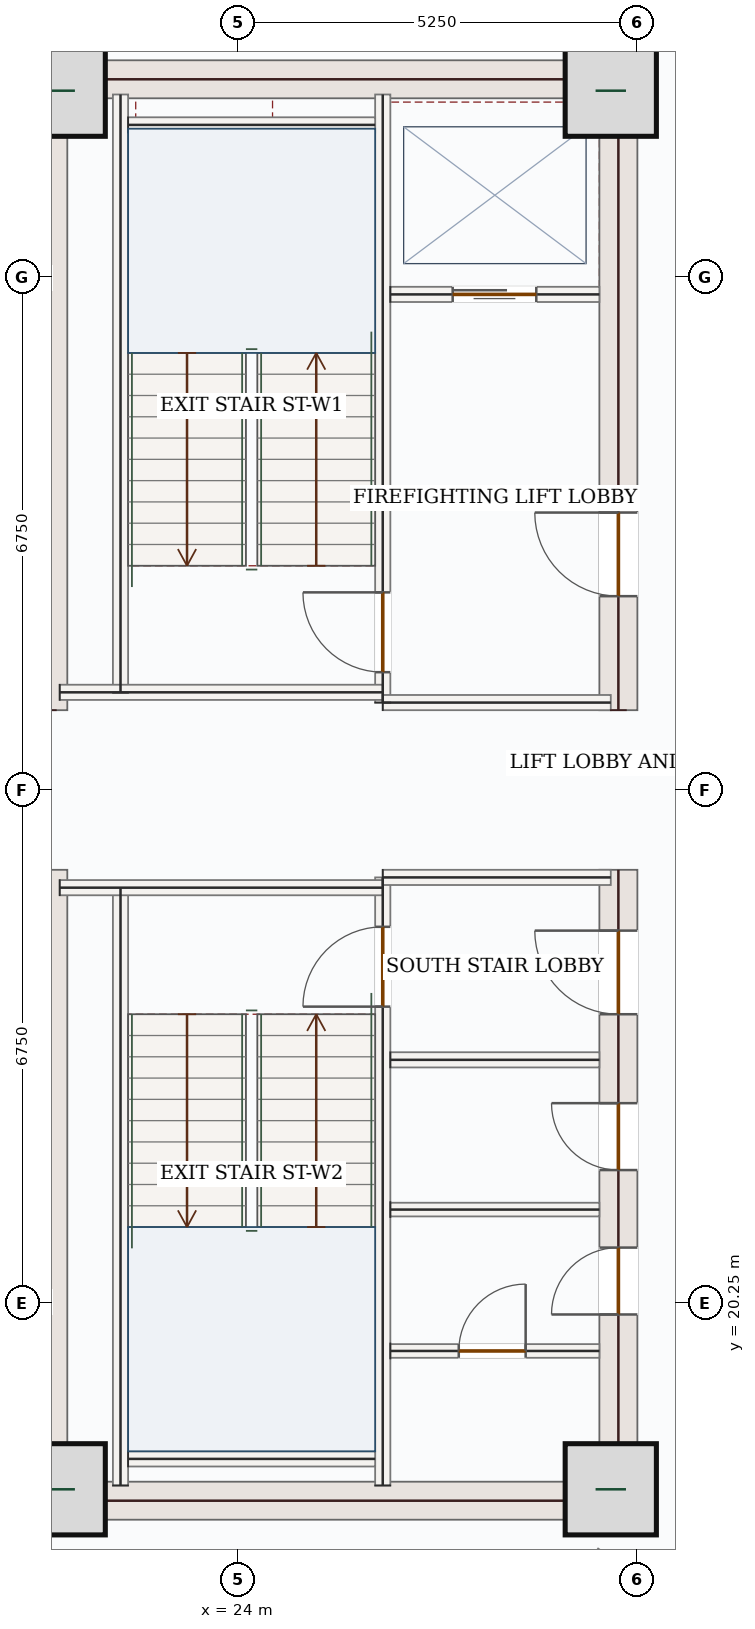
"""IFC4 building model, lengths in metres.
Left out: names, types, materials, properties, quantities, classifications, styles, units other than length and angle.
Written with IfcOpenShell. Run it as: python <this file> out.ifc"""

import sys

from ifc_helpers import new_model, si_unit, direction, frame, frame_2d, origin, origin_2d, place, context, subcontext, project, spatial, rectangle, extrude, source, transform, mapped, element, fill, save


model = new_model("IFC4")
c1 = context("Model", 3, precision=1e-05, world=origin(), true_north=direction((0.0, 1.0)))
c2 = subcontext(c1, "Body", "Model", "MODEL_VIEW")
j1 = project(units=[si_unit("LENGTHUNIT", "METRE"), si_unit("PLANEANGLEUNIT", "RADIAN")], contexts=[c1])
p1 = place(None, origin())
s1 = spatial("IfcSite", under=j1, at=p1, CompositionType="ELEMENT")
p2 = place(p1, origin())
s2 = spatial("IfcBuilding", under=s1, at=p2, CompositionType="ELEMENT")
p3 = place(p2, frame((0.0, 0.0, 135.6)))
s3 = spatial("IfcBuildingStorey", under=s2, at=p3, CompositionType="ELEMENT", Elevation=135.6)
m1 = source(origin(), c2, "Body", "SweptSolid", [
    extrude(rectangle(XDim=8.55, YDim=0.5, at=frame_2d((4.275, 0.0))), origin(), (0.0, 0.0, 1.0), 3.62),
])
for number, where, z_axis, x_axis in (
    (1, (21.5, 17.4, 0.0), (0.0, 0.0, 1.0), (0.0, 1.0, 0.0)),
    (2, (21.5, 28.05, 0.0), (0.0, 0.0, 1.0), (0.0, 1.0, 0.0)),
):
    element("IfcWall", number, at=place(p3, frame(where, z_axis=z_axis, x_axis=x_axis)), inside=s3, PredefinedType="SHEAR", context=c2, shape_type="MappedRepresentation", body=[
        mapped(m1, transform((0.0, 0.0, 0.0), x_axis=(1.0, 0.0, 0.0), y_axis=(0.0, 1.0, 0.0), z_axis=(0.0, 0.0, 1.0), scale=1.0)),
    ])
p4 = place(p3, frame((29.0, 17.4, 0.0), z_axis=(0.0, 0.0, 1.0), x_axis=(0.0, 1.0, 0.0)))
e3 = element("IfcWall", 3, at=p4, inside=s3, PredefinedType="SHEAR", context=c2, shape_type="SweptSolid", body=[
    extrude(rectangle(XDim=8.55, YDim=0.5, at=frame_2d((4.275, 0.0))), origin(), (0.0, 0.0, 1.0), 3.62),
])
p5 = place(p4, frame((6.65, 0.0, 0.0)))
e4 = element("IfcOpeningElement", 4, at=p5, cuts=e3, PredefinedType="OPENING", context=c2, shape_type="SweptSolid", body=[
    extrude(rectangle(XDim=1.1, YDim=2.2, at=frame_2d((0.55, 1.1))), frame((0.0, 0.26, 0.0), z_axis=(0.0, -1.0, 0.0), x_axis=(1.0, 0.0, 0.0)), (0.0, 0.0, 1.0), 0.52),
])
p6 = place(p4, frame((2.7, 0.0, 0.0)))
e5 = element("IfcOpeningElement", 5, at=p6, cuts=e3, PredefinedType="OPENING", context=c2, shape_type="SweptSolid", body=[
    extrude(rectangle(XDim=0.88, YDim=2.1, at=frame_2d((0.44, 1.05))), frame((0.0, 0.26, 0.0), z_axis=(0.0, -1.0, 0.0), x_axis=(1.0, 0.0, 0.0)), (0.0, 0.0, 1.0), 0.52),
])
p7 = place(p4, frame((4.6, 0.0, 0.0)))
e6 = element("IfcOpeningElement", 6, at=p7, cuts=e3, PredefinedType="OPENING", context=c2, shape_type="SweptSolid", body=[
    extrude(rectangle(XDim=0.88, YDim=2.1, at=frame_2d((0.44, 1.05))), frame((0.0, 0.26, 0.0), z_axis=(0.0, -1.0, 0.0), x_axis=(1.0, 0.0, 0.0)), (0.0, 0.0, 1.0), 0.52),
])
p8 = place(p3, frame((29.0, 28.05, 0.0), z_axis=(0.0, 0.0, 1.0), x_axis=(0.0, 1.0, 0.0)))
e7 = element("IfcWall", 7, at=p8, inside=s3, PredefinedType="SHEAR", context=c2, shape_type="SweptSolid", body=[
    extrude(rectangle(XDim=8.55, YDim=0.5, at=frame_2d((4.275, 0.0))), origin(), (0.0, 0.0, 1.0), 3.62),
])
p9 = place(p8, frame((1.5, 0.0, 0.0)))
e8 = element("IfcOpeningElement", 8, at=p9, cuts=e7, PredefinedType="OPENING", context=c2, shape_type="SweptSolid", body=[
    extrude(rectangle(XDim=1.1, YDim=2.2, at=frame_2d((0.55, 1.1))), frame((0.0, 0.26, 0.0), z_axis=(0.0, -1.0, 0.0), x_axis=(1.0, 0.0, 0.0)), (0.0, 0.0, 1.0), 0.52),
])
m2 = source(origin(), c2, "Body", "SweptSolid", [
    extrude(rectangle(XDim=7.0, YDim=0.5, at=frame_2d((3.5, 0.0))), origin(), (0.0, 0.0, 1.0), 3.62),
])
for number, where, z_axis, x_axis in (
    (9, (21.75, 17.65, 0.0), (0.0, 0.0, 1.0), (1.0, 0.0, 0.0)),
    (10, (21.75, 36.35, 0.0), (0.0, 0.0, 1.0), (1.0, 0.0, 0.0)),
):
    element("IfcWall", number, at=place(p3, frame(where, z_axis=z_axis, x_axis=x_axis)), inside=s3, PredefinedType="SHEAR", context=c2, shape_type="MappedRepresentation", body=[
        mapped(m2, transform((0.0, 0.0, 0.0), x_axis=(1.0, 0.0, 0.0), y_axis=(0.0, 1.0, 0.0), z_axis=(0.0, 0.0, 1.0), scale=1.0)),
    ])
m3 = source(origin(), c2, "Body", "SweptSolid", [
    extrude(rectangle(XDim=1.2, YDim=1.2, at=origin_2d()), origin(), (0.0, 0.0, 1.0), 3.9),
])
for number, where, z_axis, x_axis in (
    (11, (21.65, 17.8, 0.0), (0.0, 0.0, 1.0), (1.0, 0.0, 0.0)),
    (12, (28.9, 17.8, 0.0), (0.0, 0.0, 1.0), (1.0, 0.0, 0.0)),
    (13, (21.65, 36.2, 0.0), (0.0, 0.0, 1.0), (1.0, 0.0, 0.0)),
    (14, (28.9, 36.2, 0.0), (0.0, 0.0, 1.0), (1.0, 0.0, 0.0)),
):
    element("IfcColumn", number, at=place(p3, frame(where, z_axis=z_axis, x_axis=x_axis)), inside=s3, PredefinedType="COLUMN", context=c2, shape_type="MappedRepresentation", body=[
        mapped(m3, transform((0.0, 0.0, 0.0), x_axis=(1.0, 0.0, 0.0), y_axis=(0.0, 1.0, 0.0), z_axis=(0.0, 0.0, 1.0), scale=1.0)),
    ])
p10 = place(p3, frame((22.658, 14.74, 0.0), z_axis=(0.0, 0.0, 1.0), x_axis=(-0.707076011326, 0.707137549708, 0.0)))
e15 = element("IfcWall", 15, at=p10, inside=s3, PredefinedType="SOLIDWALL", context=c2, shape_type="SweptSolid", body=[
    extrude(rectangle(XDim=3.967, YDim=0.28, at=frame_2d((1.984, 0.0))), origin(), (0.0, 0.0, 1.0), 3.62),
])
p11 = place(p10, frame((1.084, 0.0, 0.85)))
e16 = element("IfcOpeningElement", 16, at=p11, cuts=e15, PredefinedType="OPENING", context=c2, shape_type="SweptSolid", body=[
    extrude(rectangle(XDim=1.8, YDim=1.75, at=frame_2d((0.9, 0.875))), frame((0.0, 0.15, 0.0), z_axis=(0.0, -1.0, 0.0), x_axis=(1.0, 0.0, 0.0)), (0.0, 0.0, 1.0), 0.3),
])
m4 = source(origin(), c2, "Body", "SweptSolid", [
    extrude(rectangle(XDim=5.258, YDim=0.28, at=frame_2d((2.629, 0.0))), origin(), (0.0, 0.0, 1.0), 3.62),
])
p12 = place(p3, frame((18.94, 35.542, 0.0), z_axis=(0.0, 0.0, 1.0), x_axis=(0.707106781187, 0.707106781187, 0.0)))
e17 = element("IfcWall", 17, at=p12, inside=s3, PredefinedType="SOLIDWALL", context=c2, shape_type="MappedRepresentation", body=[
    mapped(m4, transform((0.0, 0.0, 0.0), x_axis=(1.0, 0.0, 0.0), y_axis=(0.0, 1.0, 0.0), z_axis=(0.0, 0.0, 1.0), scale=1.0)),
])
m5 = source(origin(), c2, "Body", "SweptSolid", [
    extrude(rectangle(XDim=7.87, YDim=0.2, at=frame_2d((3.935, 0.0))), origin(), (0.0, 0.0, 1.0), 3.62),
])
for number, where, z_axis, x_axis in (
    (18, (22.45, 17.85, 0.0), (0.0, 0.0, 1.0), (0.0, 1.0, 0.0)),
    (19, (22.45, 28.28, 0.0), (0.0, 0.0, 1.0), (0.0, 1.0, 0.0)),
):
    element("IfcWall", number, at=place(p3, frame(where, z_axis=z_axis, x_axis=x_axis)), inside=s3, PredefinedType="SOLIDWALL", context=c2, shape_type="MappedRepresentation", body=[
        mapped(m5, transform((0.0, 0.0, 0.0), x_axis=(1.0, 0.0, 0.0), y_axis=(0.0, 1.0, 0.0), z_axis=(0.0, 0.0, 1.0), scale=1.0)),
    ])
p13 = place(p3, frame((25.9, 17.85, 0.0), z_axis=(0.0, 0.0, 1.0), x_axis=(0.0, 1.0, 0.0)))
e20 = element("IfcWall", 20, at=p13, inside=s3, PredefinedType="SOLIDWALL", context=c2, shape_type="SweptSolid", body=[
    extrude(rectangle(XDim=8.0, YDim=0.2, at=frame_2d((4.0, 0.0))), origin(), (0.0, 0.0, 1.0), 3.62),
])
p14 = place(p13, frame((6.3, 0.0, 0.0)))
e21 = element("IfcOpeningElement", 21, at=p14, cuts=e20, PredefinedType="OPENING", context=c2, shape_type="SweptSolid", body=[
    extrude(rectangle(XDim=1.05, YDim=2.15, at=frame_2d((0.525, 1.075))), frame((0.0, 0.11, 0.0), z_axis=(0.0, -1.0, 0.0), x_axis=(1.0, 0.0, 0.0)), (0.0, 0.0, 1.0), 0.22),
])
p15 = place(p3, frame((25.9, 28.15, 0.0), z_axis=(0.0, 0.0, 1.0), x_axis=(0.0, 1.0, 0.0)))
e22 = element("IfcWall", 22, at=p15, inside=s3, PredefinedType="SOLIDWALL", context=c2, shape_type="SweptSolid", body=[
    extrude(rectangle(XDim=8.0, YDim=0.2, at=frame_2d((4.0, 0.0))), origin(), (0.0, 0.0, 1.0), 3.62),
])
p16 = place(p15, frame((0.4, 0.0, 0.0)))
e23 = element("IfcOpeningElement", 23, at=p16, cuts=e22, PredefinedType="OPENING", context=c2, shape_type="SweptSolid", body=[
    extrude(rectangle(XDim=1.05, YDim=2.15, at=frame_2d((0.525, 1.075))), frame((0.0, 0.11, 0.0), z_axis=(0.0, -1.0, 0.0), x_axis=(1.0, 0.0, 0.0)), (0.0, 0.0, 1.0), 0.22),
])
m6 = source(origin(), c2, "Body", "SweptSolid", [
    extrude(rectangle(XDim=4.25, YDim=0.2, at=frame_2d((2.125, 0.0))), origin(), (0.0, 0.0, 1.0), 3.62),
])
p17 = place(p3, frame((21.65, 25.715, 0.0), z_axis=(0.0, 0.0, 1.0), x_axis=(1.0, 0.0, 0.0)))
e24 = element("IfcWall", 24, at=p17, inside=s3, PredefinedType="SOLIDWALL", context=c2, shape_type="MappedRepresentation", body=[
    mapped(m6, transform((0.0, 0.0, 0.0), x_axis=(1.0, 0.0, 0.0), y_axis=(0.0, 1.0, 0.0), z_axis=(0.0, 0.0, 1.0), scale=1.0)),
])
m7 = source(origin(), c2, "Body", "SweptSolid", [
    extrude(rectangle(XDim=3.0, YDim=0.2, at=frame_2d((1.5, 0.0))), origin(), (0.0, 0.0, 1.0), 3.62),
])
p18 = place(p3, frame((25.9, 25.85, 0.0), z_axis=(0.0, 0.0, 1.0), x_axis=(1.0, 0.0, 0.0)))
e25 = element("IfcWall", 25, at=p18, inside=s3, PredefinedType="SOLIDWALL", context=c2, shape_type="MappedRepresentation", body=[
    mapped(m7, transform((0.0, 0.0, 0.0), x_axis=(1.0, 0.0, 0.0), y_axis=(0.0, 1.0, 0.0), z_axis=(0.0, 0.0, 1.0), scale=1.0)),
])
p19 = place(p3, frame((21.65, 28.285, 0.0), z_axis=(0.0, 0.0, 1.0), x_axis=(1.0, 0.0, 0.0)))
e26 = element("IfcWall", 26, at=p19, inside=s3, PredefinedType="SOLIDWALL", context=c2, shape_type="MappedRepresentation", body=[
    mapped(m6, transform((0.0, 0.0, 0.0), x_axis=(1.0, 0.0, 0.0), y_axis=(0.0, 1.0, 0.0), z_axis=(0.0, 0.0, 1.0), scale=1.0)),
])
p20 = place(p3, frame((25.9, 28.15, 0.0), z_axis=(0.0, 0.0, 1.0), x_axis=(1.0, 0.0, 0.0)))
e27 = element("IfcWall", 27, at=p20, inside=s3, PredefinedType="SOLIDWALL", context=c2, shape_type="MappedRepresentation", body=[
    mapped(m7, transform((0.0, 0.0, 0.0), x_axis=(1.0, 0.0, 0.0), y_axis=(0.0, 1.0, 0.0), z_axis=(0.0, 0.0, 1.0), scale=1.0)),
])
m8 = source(origin(), c2, "Body", "SweptSolid", [
    extrude(rectangle(XDim=3.25, YDim=0.2, at=frame_2d((1.625, 0.0))), origin(), (0.0, 0.0, 1.0), 3.62),
])
for number, where, z_axis, x_axis in (
    (28, (22.55, 35.75, 0.0), (0.0, 0.0, 1.0), (1.0, 0.0, 0.0)),
    (29, (22.55, 18.2, 0.0), (0.0, 0.0, 1.0), (1.0, 0.0, 0.0)),
):
    element("IfcWall", number, at=place(p3, frame(where, z_axis=z_axis, x_axis=x_axis)), inside=s3, PredefinedType="SOLIDWALL", context=c2, shape_type="MappedRepresentation", body=[
        mapped(m8, transform((0.0, 0.0, 0.0), x_axis=(1.0, 0.0, 0.0), y_axis=(0.0, 1.0, 0.0), z_axis=(0.0, 0.0, 1.0), scale=1.0)),
    ])
p21 = place(p3, frame((26.0, 33.52, 0.0), z_axis=(0.0, 0.0, 1.0), x_axis=(1.0, 0.0, 0.0)))
e30 = element("IfcWall", 30, at=p21, inside=s3, PredefinedType="SOLIDWALL", context=c2, shape_type="SweptSolid", body=[
    extrude(rectangle(XDim=2.75, YDim=0.2, at=frame_2d((1.375, 0.0))), origin(), (0.0, 0.0, 1.0), 3.62),
])
p22 = place(p21, frame((0.82, 0.0, 0.0)))
e31 = element("IfcOpeningElement", 31, at=p22, cuts=e30, PredefinedType="OPENING", context=c2, shape_type="SweptSolid", body=[
    extrude(rectangle(XDim=1.1, YDim=2.15, at=frame_2d((0.55, 1.075))), frame((0.0, 0.11, 0.0), z_axis=(0.0, -1.0, 0.0), x_axis=(1.0, 0.0, 0.0)), (0.0, 0.0, 1.0), 0.22),
])
m9 = source(origin(), c2, "Body", "SweptSolid", [
    extrude(rectangle(XDim=2.75, YDim=0.2, at=frame_2d((1.375, 0.0))), origin(), (0.0, 0.0, 1.0), 3.62),
])
p23 = place(p3, frame((26.0, 23.45, 0.0), z_axis=(0.0, 0.0, 1.0), x_axis=(1.0, 0.0, 0.0)))
e32 = element("IfcWall", 32, at=p23, inside=s3, PredefinedType="SOLIDWALL", context=c2, shape_type="MappedRepresentation", body=[
    mapped(m9, transform((0.0, 0.0, 0.0), x_axis=(1.0, 0.0, 0.0), y_axis=(0.0, 1.0, 0.0), z_axis=(0.0, 0.0, 1.0), scale=1.0)),
])
p24 = place(p3, frame((26.0, 19.62, 0.0), z_axis=(0.0, 0.0, 1.0), x_axis=(1.0, 0.0, 0.0)))
e33 = element("IfcWall", 33, at=p24, inside=s3, PredefinedType="PARTITIONING", context=c2, shape_type="SweptSolid", body=[
    extrude(rectangle(XDim=2.75, YDim=0.18, at=frame_2d((1.375, 0.0))), origin(), (0.0, 0.0, 1.0), 3.62),
])
p25 = place(p24, frame((0.9, 0.0, 0.0)))
e34 = element("IfcOpeningElement", 34, at=p25, cuts=e33, PredefinedType="OPENING", context=c2, shape_type="SweptSolid", body=[
    extrude(rectangle(XDim=0.88, YDim=2.1, at=frame_2d((0.44, 1.05))), frame((0.0, 0.1, 0.0), z_axis=(0.0, -1.0, 0.0), x_axis=(1.0, 0.0, 0.0)), (0.0, 0.0, 1.0), 0.2),
])
m10 = source(origin(), c2, "Body", "SweptSolid", [
    extrude(rectangle(XDim=2.75, YDim=0.18, at=frame_2d((1.375, 0.0))), origin(), (0.0, 0.0, 1.0), 3.62),
])
p26 = place(p3, frame((26.0, 21.48, 0.0), z_axis=(0.0, 0.0, 1.0), x_axis=(1.0, 0.0, 0.0)))
e35 = element("IfcWall", 35, at=p26, inside=s3, PredefinedType="PARTITIONING", context=c2, shape_type="MappedRepresentation", body=[
    mapped(m10, transform((0.0, 0.0, 0.0), x_axis=(1.0, 0.0, 0.0), y_axis=(0.0, 1.0, 0.0), z_axis=(0.0, 0.0, 1.0), scale=1.0)),
])
m11 = source(origin(), c2, "Body", "SweptSolid", [
    extrude(rectangle(XDim=2.565, YDim=0.14, at=frame_2d((1.282, 0.0))), origin(), (0.0, 0.0, 1.0), 3.62),
])
p27 = place(p3, frame((27.311, 14.885, 0.0), z_axis=(0.0, 0.0, 1.0), x_axis=(0.576926084836, 0.816796359343, 0.0)))
e36 = element("IfcWall", 36, at=p27, inside=s3, PredefinedType="PARTITIONING", context=c2, shape_type="MappedRepresentation", body=[
    mapped(m11, transform((0.0, 0.0, 0.0), x_axis=(1.0, 0.0, 0.0), y_axis=(0.0, 1.0, 0.0), z_axis=(0.0, 0.0, 1.0), scale=1.0)),
])
m12 = source(origin(), c2, "Body", "SweptSolid", [
    extrude(rectangle(XDim=1.05, YDim=2.15, at=frame_2d((0.525, 1.075))), frame((0.0, 0.025, 0.0), z_axis=(0.0, -1.0, 0.0), x_axis=(1.0, 0.0, 0.0)), (0.0, 0.0, 1.0), 0.05),
])
p28 = place(p16, origin())
e37 = element("IfcDoor", 37, at=p28, inside=s3, OperationType="SINGLE_SWING_RIGHT", PredefinedType="DOOR", context=c2, shape_type="MappedRepresentation", body=[
    mapped(m12, transform((0.0, 0.0, 0.0), x_axis=(1.0, 0.0, 0.0), y_axis=(0.0, 1.0, 0.0), z_axis=(0.0, 0.0, 1.0), scale=1.0)),
])
fill(e23, e37)
p29 = place(p14, origin())
e38 = element("IfcDoor", 38, at=p29, inside=s3, OperationType="SINGLE_SWING_LEFT", PredefinedType="DOOR", context=c2, shape_type="MappedRepresentation", body=[
    mapped(m12, transform((0.0, 0.0, 0.0), x_axis=(1.0, 0.0, 0.0), y_axis=(0.0, 1.0, 0.0), z_axis=(0.0, 0.0, 1.0), scale=1.0)),
])
fill(e21, e38)
m13 = source(origin(), c2, "Body", "SweptSolid", [
    extrude(rectangle(XDim=1.1, YDim=2.15, at=frame_2d((0.55, 1.075))), frame((0.0, 0.025, 0.0), z_axis=(0.0, -1.0, 0.0), x_axis=(1.0, 0.0, 0.0)), (0.0, 0.0, 1.0), 0.05),
])
p30 = place(p22, origin())
e39 = element("IfcDoor", 39, at=p30, inside=s3, OperationType="DOUBLE_DOOR_SLIDING", PredefinedType="DOOR", context=c2, shape_type="MappedRepresentation", body=[
    mapped(m13, transform((0.0, 0.0, 0.0), x_axis=(1.0, 0.0, 0.0), y_axis=(0.0, 1.0, 0.0), z_axis=(0.0, 0.0, 1.0), scale=1.0)),
])
fill(e31, e39)
m14 = source(origin(), c2, "Body", "SweptSolid", [
    extrude(rectangle(XDim=1.1, YDim=2.2, at=frame_2d((0.55, 1.1))), frame((0.0, 0.025, 0.0), z_axis=(0.0, -1.0, 0.0), x_axis=(1.0, 0.0, 0.0)), (0.0, 0.0, 1.0), 0.05),
])
p31 = place(p9, origin())
e40 = element("IfcDoor", 40, at=p31, inside=s3, OperationType="SINGLE_SWING_RIGHT", PredefinedType="DOOR", context=c2, shape_type="MappedRepresentation", body=[
    mapped(m14, transform((0.0, 0.0, 0.0), x_axis=(1.0, 0.0, 0.0), y_axis=(0.0, 1.0, 0.0), z_axis=(0.0, 0.0, 1.0), scale=1.0)),
])
fill(e8, e40)
p32 = place(p5, origin())
e41 = element("IfcDoor", 41, at=p32, inside=s3, OperationType="SINGLE_SWING_RIGHT", PredefinedType="DOOR", context=c2, shape_type="MappedRepresentation", body=[
    mapped(m14, transform((0.0, 0.0, 0.0), x_axis=(1.0, 0.0, 0.0), y_axis=(0.0, 1.0, 0.0), z_axis=(0.0, 0.0, 1.0), scale=1.0)),
])
fill(e4, e41)
m15 = source(origin(), c2, "Body", "SweptSolid", [
    extrude(rectangle(XDim=0.88, YDim=2.1, at=frame_2d((0.44, 1.05))), frame((0.0, 0.025, 0.0), z_axis=(0.0, -1.0, 0.0), x_axis=(1.0, 0.0, 0.0)), (0.0, 0.0, 1.0), 0.05),
])
p33 = place(p25, origin())
e42 = element("IfcDoor", 42, at=p33, inside=s3, OperationType="SINGLE_SWING_RIGHT", PredefinedType="DOOR", context=c2, shape_type="MappedRepresentation", body=[
    mapped(m15, transform((0.0, 0.0, 0.0), x_axis=(1.0, 0.0, 0.0), y_axis=(0.0, 1.0, 0.0), z_axis=(0.0, 0.0, 1.0), scale=1.0)),
])
fill(e34, e42)
p34 = place(p6, origin())
e43 = element("IfcDoor", 43, at=p34, inside=s3, OperationType="SINGLE_SWING_LEFT", PredefinedType="DOOR", context=c2, shape_type="MappedRepresentation", body=[
    mapped(m15, transform((0.0, 0.0, 0.0), x_axis=(1.0, 0.0, 0.0), y_axis=(0.0, 1.0, 0.0), z_axis=(0.0, 0.0, 1.0), scale=1.0)),
])
fill(e5, e43)
p35 = place(p7, origin())
e44 = element("IfcDoor", 44, at=p35, inside=s3, OperationType="SINGLE_SWING_RIGHT", PredefinedType="DOOR", context=c2, shape_type="MappedRepresentation", body=[
    mapped(m15, transform((0.0, 0.0, 0.0), x_axis=(1.0, 0.0, 0.0), y_axis=(0.0, 1.0, 0.0), z_axis=(0.0, 0.0, 1.0), scale=1.0)),
])
fill(e6, e44)
save(model, sys.argv[1])
